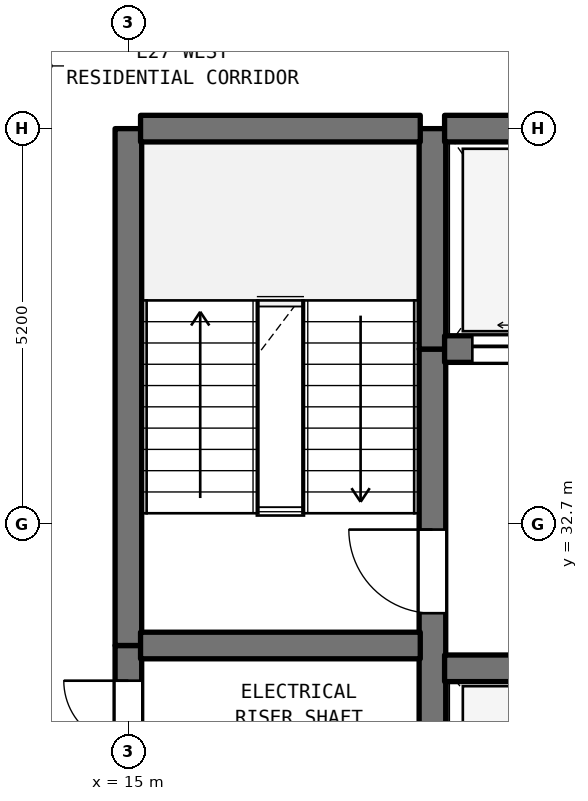
"""IFC4 building model, lengths in metres.
Left out: names, types, materials, properties, quantities, classifications, styles, units other than length and angle.
Written with IfcOpenShell. Run it as: python <this file> out.ifc"""

import sys

from ifc_helpers import new_model, si_unit, direction, frame, frame_2d, origin, place, context, subcontext, project, spatial, rectangle, extrude, element, fill, save


model = new_model("IFC4")
c1 = context("Model", 3, precision=1e-05, world=origin(), true_north=direction((0.0, 1.0)))
c2 = subcontext(c1, "Body", "Model", "MODEL_VIEW")
j1 = project(units=[si_unit("LENGTHUNIT", "METRE"), si_unit("PLANEANGLEUNIT", "RADIAN")], contexts=[c1])
p1 = place(None, origin())
s1 = spatial("IfcSite", under=j1, at=p1, CompositionType="ELEMENT")
p2 = place(p1, origin())
s2 = spatial("IfcBuilding", under=s1, at=p2, CompositionType="ELEMENT")
p3 = place(p2, frame((0.0, 0.0, 113.1)))
s3 = spatial("IfcBuildingStorey", under=s2, at=p3, CompositionType="ELEMENT", Elevation=113.1)
p4 = place(p3, frame((15.0, 29.5, 0.0), z_axis=(0.0, 0.0, 1.0), x_axis=(0.0, 1.0, 0.0)))
e1 = element("IfcWall", 1, at=p4, inside=s3, PredefinedType="SHEAR", context=c2, shape_type="SweptSolid", body=[
    extrude(rectangle(XDim=1.6, YDim=0.35, at=frame_2d((0.8, 0.0))), origin(), (0.0, 0.0, 1.0), 3.385),
])
p5 = place(p4, frame((0.287, 0.0, 0.0)))
e2 = element("IfcOpeningElement", 2, at=p5, cuts=e1, PredefinedType="OPENING", context=c2, shape_type="SweptSolid", body=[
    extrude(rectangle(XDim=0.85, YDim=2.1, at=frame_2d((0.425, 1.05))), frame((0.0, 0.185, 0.0), z_axis=(0.0, -1.0, 0.0), x_axis=(1.0, 0.0, 0.0)), (0.0, 0.0, 1.0), 0.37),
])
p6 = place(p3, frame((15.0, 31.1, 0.0), z_axis=(0.0, 0.0, 1.0), x_axis=(0.0, 1.0, 0.0)))
e3 = element("IfcWall", 3, at=p6, inside=s3, PredefinedType="SHEAR", context=c2, shape_type="SweptSolid", body=[
    extrude(rectangle(XDim=6.8, YDim=0.35, at=frame_2d((3.4, 0.0))), origin(), (0.0, 0.0, 1.0), 3.385),
])
p7 = place(p3, frame((19.0, 29.5, 0.0), z_axis=(0.0, 0.0, 1.0), x_axis=(0.0, 1.0, 0.0)))
e4 = element("IfcWall", 4, at=p7, inside=s3, PredefinedType="SHEAR", context=c2, shape_type="SweptSolid", body=[
    extrude(rectangle(XDim=5.5, YDim=0.35, at=frame_2d((2.75, 0.0))), origin(), (0.0, 0.0, 1.0), 3.385),
])
p8 = place(p7, frame((2.025, 0.0, 0.0)))
e5 = element("IfcOpeningElement", 5, at=p8, cuts=e4, PredefinedType="OPENING", context=c2, shape_type="SweptSolid", body=[
    extrude(rectangle(XDim=1.1, YDim=2.15, at=frame_2d((0.55, 1.075))), frame((0.0, 0.185, 0.0), z_axis=(0.0, -1.0, 0.0), x_axis=(1.0, 0.0, 0.0)), (0.0, 0.0, 1.0), 0.37),
])
p9 = place(p3, frame((19.0, 35.0, 0.0), z_axis=(0.0, 0.0, 1.0), x_axis=(0.0, 1.0, 0.0)))
e6 = element("IfcWall", 6, at=p9, inside=s3, PredefinedType="SHEAR", context=c2, shape_type="SweptSolid", body=[
    extrude(rectangle(XDim=2.9, YDim=0.35, at=frame_2d((1.45, 0.0))), origin(), (0.0, 0.0, 1.0), 3.385),
])
p10 = place(p3, frame((19.16, 30.8, 0.0), z_axis=(0.0, 0.0, 1.0), x_axis=(1.0, 0.0, 0.0)))
e7 = element("IfcWall", 7, at=p10, inside=s3, PredefinedType="SHEAR", context=c2, shape_type="SweptSolid", body=[
    extrude(rectangle(XDim=4.48, YDim=0.35, at=frame_2d((2.24, 0.0))), origin(), (0.0, 0.0, 1.0), 3.385),
])
p11 = place(p3, frame((15.16, 31.1, 0.0), z_axis=(0.0, 0.0, 1.0), x_axis=(1.0, 0.0, 0.0)))
e8 = element("IfcWall", 8, at=p11, inside=s3, PredefinedType="SHEAR", context=c2, shape_type="SweptSolid", body=[
    extrude(rectangle(XDim=3.68, YDim=0.35, at=frame_2d((1.84, 0.0))), origin(), (0.0, 0.0, 1.0), 3.385),
])
p12 = place(p3, frame((19.16, 35.0, 0.0), z_axis=(0.0, 0.0, 1.0), x_axis=(1.0, 0.0, 0.0)))
e9 = element("IfcWall", 9, at=p12, inside=s3, PredefinedType="SHEAR", context=c2, shape_type="SweptSolid", body=[
    extrude(rectangle(XDim=11.48, YDim=0.35, at=frame_2d((5.74, 0.0))), origin(), (0.0, 0.0, 1.0), 3.385),
])
p13 = place(p12, frame((0.365, 0.0, 0.0)))
e10 = element("IfcOpeningElement", 10, at=p13, cuts=e9, PredefinedType="OPENING", context=c2, shape_type="SweptSolid", body=[
    extrude(rectangle(XDim=1.35, YDim=2.2, at=frame_2d((0.675, 1.1))), frame((0.0, 0.185, 0.0), z_axis=(0.0, -1.0, 0.0), x_axis=(1.0, 0.0, 0.0)), (0.0, 0.0, 1.0), 0.37),
])
p14 = place(p12, frame((2.765, 0.0, 0.0)))
e11 = element("IfcOpeningElement", 11, at=p14, cuts=e9, PredefinedType="OPENING", context=c2, shape_type="SweptSolid", body=[
    extrude(rectangle(XDim=1.35, YDim=2.2, at=frame_2d((0.675, 1.1))), frame((0.0, 0.185, 0.0), z_axis=(0.0, -1.0, 0.0), x_axis=(1.0, 0.0, 0.0)), (0.0, 0.0, 1.0), 0.37),
])
p15 = place(p12, frame((4.915, 0.0, 0.0)))
e12 = element("IfcOpeningElement", 12, at=p15, cuts=e9, PredefinedType="OPENING", context=c2, shape_type="SweptSolid", body=[
    extrude(rectangle(XDim=1.2, YDim=2.2, at=frame_2d((0.6, 1.1))), frame((0.0, 0.185, 0.0), z_axis=(0.0, -1.0, 0.0), x_axis=(1.0, 0.0, 0.0)), (0.0, 0.0, 1.0), 0.37),
])
p16 = place(p12, frame((6.665, 0.0, 0.0)))
e13 = element("IfcOpeningElement", 13, at=p16, cuts=e9, PredefinedType="OPENING", context=c2, shape_type="SweptSolid", body=[
    extrude(rectangle(XDim=1.2, YDim=2.2, at=frame_2d((0.6, 1.1))), frame((0.0, 0.185, 0.0), z_axis=(0.0, -1.0, 0.0), x_axis=(1.0, 0.0, 0.0)), (0.0, 0.0, 1.0), 0.37),
])
p17 = place(p12, frame((8.415, 0.0, 0.0)))
e14 = element("IfcOpeningElement", 14, at=p17, cuts=e9, PredefinedType="OPENING", context=c2, shape_type="SweptSolid", body=[
    extrude(rectangle(XDim=1.2, YDim=2.2, at=frame_2d((0.6, 1.1))), frame((0.0, 0.185, 0.0), z_axis=(0.0, -1.0, 0.0), x_axis=(1.0, 0.0, 0.0)), (0.0, 0.0, 1.0), 0.37),
])
p18 = place(p12, frame((10.16, 0.0, 0.0)))
e15 = element("IfcOpeningElement", 15, at=p18, cuts=e9, PredefinedType="OPENING", context=c2, shape_type="SweptSolid", body=[
    extrude(rectangle(XDim=1.2, YDim=2.2, at=frame_2d((0.6, 1.1))), frame((0.0, 0.185, 0.0), z_axis=(0.0, -1.0, 0.0), x_axis=(1.0, 0.0, 0.0)), (0.0, 0.0, 1.0), 0.37),
])
p19 = place(p3, frame((15.16, 37.9, 0.0), z_axis=(0.0, 0.0, 1.0), x_axis=(1.0, 0.0, 0.0)))
e16 = element("IfcWall", 16, at=p19, inside=s3, PredefinedType="SHEAR", context=c2, shape_type="SweptSolid", body=[
    extrude(rectangle(XDim=3.68, YDim=0.35, at=frame_2d((1.84, 0.0))), origin(), (0.0, 0.0, 1.0), 3.385),
])
p20 = place(p3, frame((19.16, 37.9, 0.0), z_axis=(0.0, 0.0, 1.0), x_axis=(1.0, 0.0, 0.0)))
e17 = element("IfcWall", 17, at=p20, inside=s3, PredefinedType="SHEAR", context=c2, shape_type="SweptSolid", body=[
    extrude(rectangle(XDim=11.48, YDim=0.35, at=frame_2d((5.74, 0.0))), origin(), (0.0, 0.0, 1.0), 3.385),
])
p21 = place(p5, origin())
e18 = element("IfcDoor", 18, at=p21, inside=s3, OperationType="SINGLE_SWING_RIGHT", PredefinedType="DOOR", context=c2, shape_type="SweptSolid", body=[
    extrude(rectangle(XDim=0.85, YDim=2.1, at=frame_2d((0.425, 1.05))), frame((0.0, 0.025, 0.0), z_axis=(0.0, -1.0, 0.0), x_axis=(1.0, 0.0, 0.0)), (0.0, 0.0, 1.0), 0.05),
])
fill(e2, e18)
p22 = place(p8, origin())
e19 = element("IfcDoor", 19, at=p22, inside=s3, OperationType="SINGLE_SWING_RIGHT", PredefinedType="DOOR", context=c2, shape_type="SweptSolid", body=[
    extrude(rectangle(XDim=1.1, YDim=2.15, at=frame_2d((0.55, 1.075))), frame((0.0, 0.025, 0.0), z_axis=(0.0, -1.0, 0.0), x_axis=(1.0, 0.0, 0.0)), (0.0, 0.0, 1.0), 0.05),
])
fill(e5, e19)
p23 = place(p13, origin())
e20 = element("IfcDoor", 20, at=p23, inside=s3, OperationType="DOUBLE_DOOR_SLIDING", PredefinedType="DOOR", context=c2, shape_type="SweptSolid", body=[
    extrude(rectangle(XDim=1.35, YDim=2.2, at=frame_2d((0.675, 1.1))), frame((0.0, 0.025, 0.0), z_axis=(0.0, -1.0, 0.0), x_axis=(1.0, 0.0, 0.0)), (0.0, 0.0, 1.0), 0.05),
])
fill(e10, e20)
save(model, sys.argv[1])
